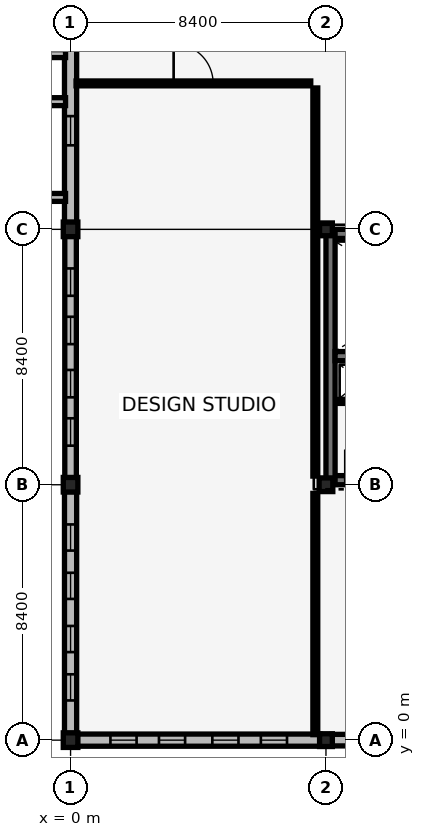
"""IFC4 building model, lengths in metres.
Left out: names, types, materials, properties, quantities, classifications, styles, units other than length and angle.
Written with IfcOpenShell. Run it as: python <this file> out.ifc"""

import sys

from ifc_helpers import new_model, si_unit, direction, frame, frame_2d, origin, origin_2d, place, context, subcontext, project, spatial, rectangle, extrude, element, fill, save


model = new_model("IFC4")
c1 = context("Model", 3, precision=1e-05, world=origin(), true_north=direction((0.0, 1.0)))
c2 = subcontext(c1, "Body", "Model", "MODEL_VIEW")
j1 = project(units=[si_unit("LENGTHUNIT", "METRE"), si_unit("PLANEANGLEUNIT", "RADIAN")], contexts=[c1])
p1 = place(None, origin())
s1 = spatial("IfcSite", under=j1, at=p1, CompositionType="ELEMENT")
p2 = place(p1, origin())
s2 = spatial("IfcBuilding", under=s1, at=p2, CompositionType="ELEMENT")
p3 = place(p2, frame((0.0, 0.0, 5.44)))
s3 = spatial("IfcBuildingStorey", under=s2, at=p3, CompositionType="ELEMENT", Elevation=5.44)
p4 = place(p3, frame((8.55, 8.55, 0.0), z_axis=(0.0, 0.0, 1.0), x_axis=(1.0, 0.0, 0.0)))
e1 = element("IfcWall", 1, at=p4, inside=s3, PredefinedType="SHEAR", context=c2, shape_type="SweptSolid", body=[
    extrude(rectangle(XDim=8.1, YDim=0.3, at=frame_2d((4.05, 0.0))), origin(), (0.0, 0.0, 1.0), 4.12),
])
p5 = place(p4, frame((0.485, 0.0, 0.0)))
e2 = element("IfcOpeningElement", 2, at=p5, cuts=e1, PredefinedType="OPENING", context=c2, shape_type="SweptSolid", body=[
    extrude(rectangle(XDim=1.0, YDim=2.15, at=frame_2d((0.5, 1.075))), frame((0.0, 0.16, 0.0), z_axis=(0.0, -1.0, 0.0), x_axis=(1.0, 0.0, 0.0)), (0.0, 0.0, 1.0), 0.32),
])
for number, where, z_axis, x_axis in (
    (3, (8.55, 16.65, 0.0), (0.0, 0.0, 1.0), (1.0, 0.0, 0.0)),
    (4, (8.55, 8.55, 0.0), (0.0, 0.0, 1.0), (0.0, 1.0, 0.0)),
):
    element("IfcWall", number, at=place(p3, frame(where, z_axis=z_axis, x_axis=x_axis)), inside=s3, PredefinedType="SHEAR", context=c2, shape_type="SweptSolid", body=[
        extrude(rectangle(XDim=8.1, YDim=0.3, at=frame_2d((4.05, 0.0))), origin(), (0.0, 0.0, 1.0), 4.12),
    ])
p6 = place(p3, frame((8.7, 12.63, 0.0), z_axis=(0.0, 0.0, 1.0), x_axis=(1.0, 0.0, 0.0)))
e5 = element("IfcWall", 5, at=p6, inside=s3, PredefinedType="SHEAR", context=c2, shape_type="SweptSolid", body=[
    extrude(rectangle(XDim=7.8, YDim=0.3, at=frame_2d((3.9, 0.0))), origin(), (0.0, 0.0, 1.0), 4.12),
])
p7 = place(p6, frame((6.2, 0.0, 0.0)))
e6 = element("IfcOpeningElement", 6, at=p7, cuts=e5, PredefinedType="OPENING", context=c2, shape_type="SweptSolid", body=[
    extrude(rectangle(XDim=1.35, YDim=2.15, at=frame_2d((0.675, 1.075))), frame((0.0, 0.16, 0.0), z_axis=(0.0, -1.0, 0.0), x_axis=(1.0, 0.0, 0.0)), (0.0, 0.0, 1.0), 0.32),
])
for number, where, z_axis, x_axis in (
    (7, (0.0, 0.0, 0.0), (0.0, 0.0, 1.0), (1.0, 0.0, 0.0)),
    (8, (0.0, 8.4, 0.0), (0.0, 0.0, 1.0), (1.0, 0.0, 0.0)),
    (9, (0.0, 16.8, 0.0), (0.0, 0.0, 1.0), (1.0, 0.0, 0.0)),
):
    element("IfcColumn", number, at=place(p3, frame(where, z_axis=z_axis, x_axis=x_axis)), inside=s3, PredefinedType="COLUMN", context=c2, shape_type="SweptSolid", body=[
        extrude(rectangle(XDim=0.48, YDim=0.48, at=origin_2d()), origin(), (0.0, 0.0, 1.0), 4.12),
    ])
p8 = place(p3, frame((8.4, 0.0, 0.0), z_axis=(0.0, 0.0, 1.0), x_axis=(1.0, 0.0, 0.0)))
e10 = element("IfcColumn", 10, at=p8, inside=s3, PredefinedType="COLUMN", context=c2, shape_type="SweptSolid", body=[
    extrude(rectangle(XDim=0.42, YDim=0.42, at=origin_2d()), origin(), (0.0, 0.0, 1.0), 4.12),
])
p9 = place(p3, frame((8.4, 8.4, 0.0), z_axis=(0.0, 0.0, 1.0), x_axis=(1.0, 0.0, 0.0)))
e11 = element("IfcColumn", 11, at=p9, inside=s3, PredefinedType="COLUMN", context=c2, shape_type="SweptSolid", body=[
    extrude(rectangle(XDim=0.45, YDim=0.45, at=origin_2d()), origin(), (0.0, 0.0, 1.0), 4.12),
])
p10 = place(p3, frame((8.4, 16.8, 0.0), z_axis=(0.0, 0.0, 1.0), x_axis=(1.0, 0.0, 0.0)))
e12 = element("IfcColumn", 12, at=p10, inside=s3, PredefinedType="COLUMN", context=c2, shape_type="SweptSolid", body=[
    extrude(rectangle(XDim=0.42, YDim=0.42, at=origin_2d()), origin(), (0.0, 0.0, 1.0), 4.12),
])
p11 = place(p3, frame((0.225, 0.0, 0.0), z_axis=(0.0, 0.0, 1.0), x_axis=(1.0, 0.0, 0.0)))
e13 = element("IfcWall", 13, at=p11, inside=s3, PredefinedType="SOLIDWALL", context=c2, shape_type="SweptSolid", body=[
    extrude(rectangle(XDim=7.98, YDim=0.4, at=frame_2d((3.99, 0.0))), origin(), (0.0, 0.0, 1.0), 4.12),
])
p12 = place(p11, frame((1.086, 0.0, 0.75)))
e14 = element("IfcOpeningElement", 14, at=p12, cuts=e13, PredefinedType="OPENING", context=c2, shape_type="SweptSolid", body=[
    extrude(rectangle(XDim=0.86, YDim=2.9, at=frame_2d((0.43, 1.45))), frame((0.0, 0.21, 0.0), z_axis=(0.0, -1.0, 0.0), x_axis=(1.0, 0.0, 0.0)), (0.0, 0.0, 1.0), 0.42),
])
p13 = place(p11, frame((2.682, 0.0, 0.75)))
e15 = element("IfcOpeningElement", 15, at=p13, cuts=e13, PredefinedType="OPENING", context=c2, shape_type="SweptSolid", body=[
    extrude(rectangle(XDim=0.86, YDim=2.9, at=frame_2d((0.43, 1.45))), frame((0.0, 0.21, 0.0), z_axis=(0.0, -1.0, 0.0), x_axis=(1.0, 0.0, 0.0)), (0.0, 0.0, 1.0), 0.42),
])
p14 = place(p11, frame((4.438, 0.0, 0.75)))
e16 = element("IfcOpeningElement", 16, at=p14, cuts=e13, PredefinedType="OPENING", context=c2, shape_type="SweptSolid", body=[
    extrude(rectangle(XDim=0.86, YDim=2.9, at=frame_2d((0.43, 1.45))), frame((0.0, 0.21, 0.0), z_axis=(0.0, -1.0, 0.0), x_axis=(1.0, 0.0, 0.0)), (0.0, 0.0, 1.0), 0.42),
])
p15 = place(p11, frame((6.034, 0.0, 0.75)))
e17 = element("IfcOpeningElement", 17, at=p15, cuts=e13, PredefinedType="OPENING", context=c2, shape_type="SweptSolid", body=[
    extrude(rectangle(XDim=0.86, YDim=2.9, at=frame_2d((0.43, 1.45))), frame((0.0, 0.21, 0.0), z_axis=(0.0, -1.0, 0.0), x_axis=(1.0, 0.0, 0.0)), (0.0, 0.0, 1.0), 0.42),
])
p16 = place(p3, frame((0.0, 0.225, 0.0), z_axis=(0.0, 0.0, 1.0), x_axis=(0.0, 1.0, 0.0)))
e18 = element("IfcWall", 18, at=p16, inside=s3, PredefinedType="SOLIDWALL", context=c2, shape_type="SweptSolid", body=[
    extrude(rectangle(XDim=7.95, YDim=0.4, at=frame_2d((3.975, 0.0))), origin(), (0.0, 0.0, 1.0), 4.12),
])
p17 = place(p16, frame((1.081, 0.0, 0.75)))
e19 = element("IfcOpeningElement", 19, at=p17, cuts=e18, PredefinedType="OPENING", context=c2, shape_type="SweptSolid", body=[
    extrude(rectangle(XDim=0.86, YDim=2.9, at=frame_2d((0.43, 1.45))), frame((0.0, 0.21, 0.0), z_axis=(0.0, -1.0, 0.0), x_axis=(1.0, 0.0, 0.0)), (0.0, 0.0, 1.0), 0.42),
])
p18 = place(p16, frame((2.67, 0.0, 0.75)))
e20 = element("IfcOpeningElement", 20, at=p18, cuts=e18, PredefinedType="OPENING", context=c2, shape_type="SweptSolid", body=[
    extrude(rectangle(XDim=0.86, YDim=2.9, at=frame_2d((0.43, 1.45))), frame((0.0, 0.21, 0.0), z_axis=(0.0, -1.0, 0.0), x_axis=(1.0, 0.0, 0.0)), (0.0, 0.0, 1.0), 0.42),
])
p19 = place(p16, frame((4.419, 0.0, 0.75)))
e21 = element("IfcOpeningElement", 21, at=p19, cuts=e18, PredefinedType="OPENING", context=c2, shape_type="SweptSolid", body=[
    extrude(rectangle(XDim=0.86, YDim=2.9, at=frame_2d((0.43, 1.45))), frame((0.0, 0.21, 0.0), z_axis=(0.0, -1.0, 0.0), x_axis=(1.0, 0.0, 0.0)), (0.0, 0.0, 1.0), 0.42),
])
p20 = place(p16, frame((6.01, 0.0, 0.75)))
e22 = element("IfcOpeningElement", 22, at=p20, cuts=e18, PredefinedType="OPENING", context=c2, shape_type="SweptSolid", body=[
    extrude(rectangle(XDim=0.86, YDim=2.9, at=frame_2d((0.43, 1.45))), frame((0.0, 0.21, 0.0), z_axis=(0.0, -1.0, 0.0), x_axis=(1.0, 0.0, 0.0)), (0.0, 0.0, 1.0), 0.42),
])
p21 = place(p3, frame((0.0, 8.625, 0.0), z_axis=(0.0, 0.0, 1.0), x_axis=(0.0, 1.0, 0.0)))
e23 = element("IfcWall", 23, at=p21, inside=s3, PredefinedType="SOLIDWALL", context=c2, shape_type="SweptSolid", body=[
    extrude(rectangle(XDim=7.95, YDim=0.38, at=frame_2d((3.975, 0.0))), origin(), (0.0, 0.0, 1.0), 4.12),
])
p22 = place(p21, frame((1.061, 0.0, 0.75)))
e24 = element("IfcOpeningElement", 24, at=p22, cuts=e23, PredefinedType="OPENING", context=c2, shape_type="SweptSolid", body=[
    extrude(rectangle(XDim=0.9, YDim=2.65, at=frame_2d((0.45, 1.325))), frame((0.0, 0.2, 0.0), z_axis=(0.0, -1.0, 0.0), x_axis=(1.0, 0.0, 0.0)), (0.0, 0.0, 1.0), 0.4),
])
p23 = place(p21, frame((2.65, 0.0, 0.75)))
e25 = element("IfcOpeningElement", 25, at=p23, cuts=e23, PredefinedType="OPENING", context=c2, shape_type="SweptSolid", body=[
    extrude(rectangle(XDim=0.9, YDim=2.65, at=frame_2d((0.45, 1.325))), frame((0.0, 0.2, 0.0), z_axis=(0.0, -1.0, 0.0), x_axis=(1.0, 0.0, 0.0)), (0.0, 0.0, 1.0), 0.4),
])
p24 = place(p21, frame((4.399, 0.0, 0.75)))
e26 = element("IfcOpeningElement", 26, at=p24, cuts=e23, PredefinedType="OPENING", context=c2, shape_type="SweptSolid", body=[
    extrude(rectangle(XDim=0.9, YDim=2.65, at=frame_2d((0.45, 1.325))), frame((0.0, 0.2, 0.0), z_axis=(0.0, -1.0, 0.0), x_axis=(1.0, 0.0, 0.0)), (0.0, 0.0, 1.0), 0.4),
])
p25 = place(p21, frame((5.99, 0.0, 0.75)))
e27 = element("IfcOpeningElement", 27, at=p25, cuts=e23, PredefinedType="OPENING", context=c2, shape_type="SweptSolid", body=[
    extrude(rectangle(XDim=0.9, YDim=2.65, at=frame_2d((0.45, 1.325))), frame((0.0, 0.2, 0.0), z_axis=(0.0, -1.0, 0.0), x_axis=(1.0, 0.0, 0.0)), (0.0, 0.0, 1.0), 0.4),
])
p26 = place(p3, frame((0.0, 17.025, 0.0), z_axis=(0.0, 0.0, 1.0), x_axis=(0.0, 1.0, 0.0)))
e28 = element("IfcWall", 28, at=p26, inside=s3, PredefinedType="SOLIDWALL", context=c2, shape_type="SweptSolid", body=[
    extrude(rectangle(XDim=7.74, YDim=0.4, at=frame_2d((3.87, 0.0))), origin(), (0.0, 0.0, 1.0), 4.12),
])
p27 = place(p26, frame((2.539, 0.0, 0.75)))
e29 = element("IfcOpeningElement", 29, at=p27, cuts=e28, PredefinedType="OPENING", context=c2, shape_type="SweptSolid", body=[
    extrude(rectangle(XDim=0.96, YDim=3.1, at=frame_2d((0.48, 1.55))), frame((0.0, 0.21, 0.0), z_axis=(0.0, -1.0, 0.0), x_axis=(1.0, 0.0, 0.0)), (0.0, 0.0, 1.0), 0.42),
])
for number, where, z_axis, x_axis in (
    (30, (-0.165, 17.85, 0.0), (0.0, 0.0, 1.0), (-1.0, 0.0, 0.0)),
    (31, (-0.165, 21.0, 0.0), (0.0, 0.0, 1.0), (-1.0, 0.0, 0.0)),
    (32, (-0.165, 22.58, 0.0), (0.0, 0.0, 1.0), (-1.0, 0.0, 0.0)),
):
    element("IfcWall", number, at=place(p3, frame(where, z_axis=z_axis, x_axis=x_axis)), inside=s3, PredefinedType="SOLIDWALL", context=c2, shape_type="SweptSolid", body=[
        extrude(rectangle(XDim=0.7, YDim=0.26, at=frame_2d((0.35, 0.0))), origin(), (0.0, 0.0, 1.0), 4.42),
    ])
p28 = place(p3, frame((8.595, 0.0, 0.0), z_axis=(0.0, 0.0, 1.0), x_axis=(1.0, 0.0, 0.0)))
e33 = element("IfcWall", 33, at=p28, inside=s3, PredefinedType="SOLIDWALL", context=c2, shape_type="SweptSolid", body=[
    extrude(rectangle(XDim=7.995, YDim=0.38, at=frame_2d((3.998, 0.0))), origin(), (0.0, 0.0, 1.0), 4.12),
])
p29 = place(p28, frame((1.079, 0.0, 0.75)))
e34 = element("IfcOpeningElement", 34, at=p29, cuts=e33, PredefinedType="OPENING", context=c2, shape_type="SweptSolid", body=[
    extrude(rectangle(XDim=0.88, YDim=2.45, at=frame_2d((0.44, 1.225))), frame((0.0, 0.2, 0.0), z_axis=(0.0, -1.0, 0.0), x_axis=(1.0, 0.0, 0.0)), (0.0, 0.0, 1.0), 0.4),
])
p30 = place(p28, frame((2.678, 0.0, 0.75)))
e35 = element("IfcOpeningElement", 35, at=p30, cuts=e33, PredefinedType="OPENING", context=c2, shape_type="SweptSolid", body=[
    extrude(rectangle(XDim=0.88, YDim=2.45, at=frame_2d((0.44, 1.225))), frame((0.0, 0.2, 0.0), z_axis=(0.0, -1.0, 0.0), x_axis=(1.0, 0.0, 0.0)), (0.0, 0.0, 1.0), 0.4),
])
p31 = place(p28, frame((4.437, 0.0, 0.75)))
e36 = element("IfcOpeningElement", 36, at=p31, cuts=e33, PredefinedType="OPENING", context=c2, shape_type="SweptSolid", body=[
    extrude(rectangle(XDim=0.88, YDim=2.45, at=frame_2d((0.44, 1.225))), frame((0.0, 0.2, 0.0), z_axis=(0.0, -1.0, 0.0), x_axis=(1.0, 0.0, 0.0)), (0.0, 0.0, 1.0), 0.4),
])
p32 = place(p28, frame((6.036, 0.0, 0.75)))
e37 = element("IfcOpeningElement", 37, at=p32, cuts=e33, PredefinedType="OPENING", context=c2, shape_type="SweptSolid", body=[
    extrude(rectangle(XDim=0.88, YDim=2.45, at=frame_2d((0.44, 1.225))), frame((0.0, 0.2, 0.0), z_axis=(0.0, -1.0, 0.0), x_axis=(1.0, 0.0, 0.0)), (0.0, 0.0, 1.0), 0.4),
])
p33 = place(p3, frame((8.72, 11.14, 0.0), z_axis=(0.0, 0.0, 1.0), x_axis=(1.0, 0.0, 0.0)))
e38 = element("IfcWall", 38, at=p33, inside=s3, PredefinedType="PARTITIONING", context=c2, shape_type="SweptSolid", body=[
    extrude(rectangle(XDim=1.62, YDim=0.13, at=frame_2d((0.81, 0.0))), origin(), (0.0, 0.0, 1.0), 4.12),
])
p34 = place(p3, frame((0.18, 21.6, 0.0), z_axis=(0.0, 0.0, 1.0), x_axis=(1.0, 0.0, 0.0)))
e39 = element("IfcWall", 39, at=p34, inside=s3, PredefinedType="PARTITIONING", context=c2, shape_type="SweptSolid", body=[
    extrude(rectangle(XDim=7.72, YDim=0.16, at=frame_2d((3.86, 0.0))), origin(), (0.0, 0.0, 1.0), 4.12),
])
p35 = place(p34, frame((3.21, 0.0, 0.0)))
e40 = element("IfcOpeningElement", 40, at=p35, cuts=e39, PredefinedType="OPENING", context=c2, shape_type="SweptSolid", body=[
    extrude(rectangle(XDim=1.3, YDim=2.2, at=frame_2d((0.65, 1.1))), frame((0.0, 0.09, 0.0), z_axis=(0.0, -1.0, 0.0), x_axis=(1.0, 0.0, 0.0)), (0.0, 0.0, 1.0), 0.18),
])
p36 = place(p3, frame((8.05, 0.18, 0.0), z_axis=(0.0, 0.0, 1.0), x_axis=(0.0, 1.0, 0.0)))
e41 = element("IfcWall", 41, at=p36, inside=s3, PredefinedType="PARTITIONING", context=c2, shape_type="SweptSolid", body=[
    extrude(rectangle(XDim=7.935, YDim=0.16, at=frame_2d((3.968, 0.0))), origin(), (0.0, 0.0, 1.0), 4.12),
])
p37 = place(p3, frame((8.05, 8.685, 0.0), z_axis=(0.0, 0.0, 1.0), x_axis=(0.0, 1.0, 0.0)))
e42 = element("IfcWall", 42, at=p37, inside=s3, PredefinedType="PARTITIONING", context=c2, shape_type="SweptSolid", body=[
    extrude(rectangle(XDim=12.765, YDim=0.16, at=frame_2d((6.382, 0.0))), origin(), (0.0, 0.0, 1.0), 4.12),
])
p38 = place(p12, origin())
e43 = element("IfcWindow", 43, at=p38, inside=s3, PartitioningType="DOUBLE_PANEL_VERTICAL", PredefinedType="WINDOW", context=c2, shape_type="SweptSolid", body=[
    extrude(rectangle(XDim=0.86, YDim=2.9, at=frame_2d((0.43, 1.45))), frame((0.0, 0.03, 0.0), z_axis=(0.0, -1.0, 0.0), x_axis=(1.0, 0.0, 0.0)), (0.0, 0.0, 1.0), 0.06),
])
fill(e14, e43)
p39 = place(p13, origin())
e44 = element("IfcWindow", 44, at=p39, inside=s3, PartitioningType="DOUBLE_PANEL_VERTICAL", PredefinedType="WINDOW", context=c2, shape_type="SweptSolid", body=[
    extrude(rectangle(XDim=0.86, YDim=2.9, at=frame_2d((0.43, 1.45))), frame((0.0, 0.03, 0.0), z_axis=(0.0, -1.0, 0.0), x_axis=(1.0, 0.0, 0.0)), (0.0, 0.0, 1.0), 0.06),
])
fill(e15, e44)
p40 = place(p14, origin())
e45 = element("IfcWindow", 45, at=p40, inside=s3, PartitioningType="DOUBLE_PANEL_VERTICAL", PredefinedType="WINDOW", context=c2, shape_type="SweptSolid", body=[
    extrude(rectangle(XDim=0.86, YDim=2.9, at=frame_2d((0.43, 1.45))), frame((0.0, 0.03, 0.0), z_axis=(0.0, -1.0, 0.0), x_axis=(1.0, 0.0, 0.0)), (0.0, 0.0, 1.0), 0.06),
])
fill(e16, e45)
p41 = place(p15, origin())
e46 = element("IfcWindow", 46, at=p41, inside=s3, PartitioningType="DOUBLE_PANEL_VERTICAL", PredefinedType="WINDOW", context=c2, shape_type="SweptSolid", body=[
    extrude(rectangle(XDim=0.86, YDim=2.9, at=frame_2d((0.43, 1.45))), frame((0.0, 0.03, 0.0), z_axis=(0.0, -1.0, 0.0), x_axis=(1.0, 0.0, 0.0)), (0.0, 0.0, 1.0), 0.06),
])
fill(e17, e46)
p42 = place(p17, origin())
e47 = element("IfcWindow", 47, at=p42, inside=s3, PartitioningType="DOUBLE_PANEL_VERTICAL", PredefinedType="WINDOW", context=c2, shape_type="SweptSolid", body=[
    extrude(rectangle(XDim=0.86, YDim=2.9, at=frame_2d((0.43, 1.45))), frame((0.0, 0.03, 0.0), z_axis=(0.0, -1.0, 0.0), x_axis=(1.0, 0.0, 0.0)), (0.0, 0.0, 1.0), 0.06),
])
fill(e19, e47)
p43 = place(p18, origin())
e48 = element("IfcWindow", 48, at=p43, inside=s3, PartitioningType="DOUBLE_PANEL_VERTICAL", PredefinedType="WINDOW", context=c2, shape_type="SweptSolid", body=[
    extrude(rectangle(XDim=0.86, YDim=2.9, at=frame_2d((0.43, 1.45))), frame((0.0, 0.03, 0.0), z_axis=(0.0, -1.0, 0.0), x_axis=(1.0, 0.0, 0.0)), (0.0, 0.0, 1.0), 0.06),
])
fill(e20, e48)
p44 = place(p19, origin())
e49 = element("IfcWindow", 49, at=p44, inside=s3, PartitioningType="DOUBLE_PANEL_VERTICAL", PredefinedType="WINDOW", context=c2, shape_type="SweptSolid", body=[
    extrude(rectangle(XDim=0.86, YDim=2.9, at=frame_2d((0.43, 1.45))), frame((0.0, 0.03, 0.0), z_axis=(0.0, -1.0, 0.0), x_axis=(1.0, 0.0, 0.0)), (0.0, 0.0, 1.0), 0.06),
])
fill(e21, e49)
p45 = place(p20, origin())
e50 = element("IfcWindow", 50, at=p45, inside=s3, PartitioningType="DOUBLE_PANEL_VERTICAL", PredefinedType="WINDOW", context=c2, shape_type="SweptSolid", body=[
    extrude(rectangle(XDim=0.86, YDim=2.9, at=frame_2d((0.43, 1.45))), frame((0.0, 0.03, 0.0), z_axis=(0.0, -1.0, 0.0), x_axis=(1.0, 0.0, 0.0)), (0.0, 0.0, 1.0), 0.06),
])
fill(e22, e50)
p46 = place(p22, origin())
e51 = element("IfcWindow", 51, at=p46, inside=s3, PartitioningType="DOUBLE_PANEL_VERTICAL", PredefinedType="WINDOW", context=c2, shape_type="SweptSolid", body=[
    extrude(rectangle(XDim=0.9, YDim=2.65, at=frame_2d((0.45, 1.325))), frame((0.0, 0.03, 0.0), z_axis=(0.0, -1.0, 0.0), x_axis=(1.0, 0.0, 0.0)), (0.0, 0.0, 1.0), 0.06),
])
fill(e24, e51)
p47 = place(p23, origin())
e52 = element("IfcWindow", 52, at=p47, inside=s3, PartitioningType="DOUBLE_PANEL_VERTICAL", PredefinedType="WINDOW", context=c2, shape_type="SweptSolid", body=[
    extrude(rectangle(XDim=0.9, YDim=2.65, at=frame_2d((0.45, 1.325))), frame((0.0, 0.03, 0.0), z_axis=(0.0, -1.0, 0.0), x_axis=(1.0, 0.0, 0.0)), (0.0, 0.0, 1.0), 0.06),
])
fill(e25, e52)
p48 = place(p24, origin())
e53 = element("IfcWindow", 53, at=p48, inside=s3, PartitioningType="DOUBLE_PANEL_VERTICAL", PredefinedType="WINDOW", context=c2, shape_type="SweptSolid", body=[
    extrude(rectangle(XDim=0.9, YDim=2.65, at=frame_2d((0.45, 1.325))), frame((0.0, 0.03, 0.0), z_axis=(0.0, -1.0, 0.0), x_axis=(1.0, 0.0, 0.0)), (0.0, 0.0, 1.0), 0.06),
])
fill(e26, e53)
p49 = place(p25, origin())
e54 = element("IfcWindow", 54, at=p49, inside=s3, PartitioningType="DOUBLE_PANEL_VERTICAL", PredefinedType="WINDOW", context=c2, shape_type="SweptSolid", body=[
    extrude(rectangle(XDim=0.9, YDim=2.65, at=frame_2d((0.45, 1.325))), frame((0.0, 0.03, 0.0), z_axis=(0.0, -1.0, 0.0), x_axis=(1.0, 0.0, 0.0)), (0.0, 0.0, 1.0), 0.06),
])
fill(e27, e54)
p50 = place(p27, origin())
e55 = element("IfcWindow", 55, at=p50, inside=s3, PartitioningType="DOUBLE_PANEL_VERTICAL", PredefinedType="WINDOW", context=c2, shape_type="SweptSolid", body=[
    extrude(rectangle(XDim=0.96, YDim=3.1, at=frame_2d((0.48, 1.55))), frame((0.0, 0.03, 0.0), z_axis=(0.0, -1.0, 0.0), x_axis=(1.0, 0.0, 0.0)), (0.0, 0.0, 1.0), 0.06),
])
fill(e29, e55)
p51 = place(p5, origin())
e56 = element("IfcDoor", 56, at=p51, inside=s3, OperationType="SINGLE_SWING_LEFT", PredefinedType="DOOR", context=c2, shape_type="SweptSolid", body=[
    extrude(rectangle(XDim=1.0, YDim=2.15, at=frame_2d((0.5, 1.075))), frame((0.0, 0.025, 0.0), z_axis=(0.0, -1.0, 0.0), x_axis=(1.0, 0.0, 0.0)), (0.0, 0.0, 1.0), 0.05),
])
fill(e2, e56)
p52 = place(p35, origin())
e57 = element("IfcDoor", 57, at=p52, inside=s3, OperationType="SINGLE_SWING_LEFT", PredefinedType="DOOR", context=c2, shape_type="SweptSolid", body=[
    extrude(rectangle(XDim=1.3, YDim=2.2, at=frame_2d((0.65, 1.1))), frame((0.0, 0.025, 0.0), z_axis=(0.0, -1.0, 0.0), x_axis=(1.0, 0.0, 0.0)), (0.0, 0.0, 1.0), 0.05),
])
fill(e40, e57)
save(model, sys.argv[1])
